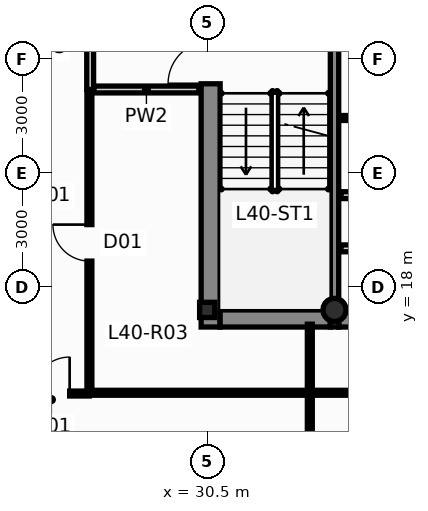
"""IFC4 building model, lengths in metres.
Left out: names, types, materials, properties, quantities, classifications, styles, units other than length and angle.
Written with IfcOpenShell. Run it as: python <this file> out.ifc"""

import sys

from ifc_helpers import new_model, si_unit, direction, frame, frame_2d, origin, origin_2d, place, context, subcontext, project, spatial, rectangle, hollow_circle, i_section, extrude, source, transform, mapped, element, fill, save


model = new_model("IFC4")
c1 = context("Model", 3, precision=1e-05, world=origin(), true_north=direction((0.0, 1.0)))
c2 = subcontext(c1, "Body", "Model", "MODEL_VIEW")
j1 = project(units=[si_unit("LENGTHUNIT", "METRE"), si_unit("PLANEANGLEUNIT", "RADIAN")], contexts=[c1])
p1 = place(None, origin())
s1 = spatial("IfcSite", under=j1, at=p1, CompositionType="ELEMENT")
p2 = place(p1, origin())
s2 = spatial("IfcBuilding", under=s1, at=p2, CompositionType="ELEMENT")
p3 = place(p2, frame((0.0, 0.0, 154.85)))
s3 = spatial("IfcBuildingStorey", under=s2, at=p3, CompositionType="ELEMENT", Elevation=154.85)
m1 = source(origin(), c2, "Body", "SweptSolid", [
    extrude(i_section(OverallWidth=0.4, OverallDepth=0.4, WebThickness=0.02, FlangeThickness=0.032, at=origin_2d()), origin(), (0.0, 0.0, 1.0), 3.65),
])
p4 = place(p3, frame((30.5, 17.4, 0.0), z_axis=(0.0, 0.0, 1.0), x_axis=(1.0, 0.0, 0.0)))
e1 = element("IfcColumn", 1, at=p4, inside=s3, PredefinedType="COLUMN", context=c2, shape_type="MappedRepresentation", body=[
    mapped(m1, transform((0.0, 0.0, 0.0), scale=1.0)),
])
m2 = source(origin(), c2, "Body", "SweptSolid", [
    extrude(hollow_circle(Radius=0.305, WallThickness=0.025, at=origin_2d()), origin(), (0.0, 0.0, 1.0), 3.65),
])
p5 = place(p3, frame((33.85, 17.4, 0.0), z_axis=(0.0, 0.0, 1.0), x_axis=(1.0, 0.0, 0.0)))
e2 = element("IfcColumn", 2, at=p5, inside=s3, PredefinedType="COLUMN", context=c2, shape_type="MappedRepresentation", body=[
    mapped(m2, transform((0.0, 0.0, 0.0), scale=1.0)),
])
p6 = place(p3, frame((30.59, 16.95, 0.0), z_axis=(0.0, 0.0, 1.0), x_axis=(0.0, 1.0, 0.0)))
e3 = element("IfcWall", 3, at=p6, inside=s3, PredefinedType="SHEAR", context=c2, shape_type="SweptSolid", body=[
    extrude(rectangle(XDim=13.275, YDim=0.5, at=frame_2d((6.638, 0.0))), origin(), (0.0, 0.0, 1.0), 3.65),
])
p7 = place(p6, frame((6.4, 0.0, 0.0)))
e4 = element("IfcOpeningElement", 4, at=p7, cuts=e3, PredefinedType="OPENING", context=c2, shape_type="SweptSolid", body=[
    extrude(rectangle(XDim=1.12, YDim=2.15, at=frame_2d((0.56, 1.075))), frame((0.0, 0.262, 0.0), z_axis=(0.0, -1.0, 0.0), x_axis=(1.0, 0.0, 0.0)), (0.0, 0.0, 1.0), 0.524),
])
p8 = place(p6, frame((10.85, 0.0, 0.0)))
e5 = element("IfcOpeningElement", 5, at=p8, cuts=e3, PredefinedType="OPENING", context=c2, shape_type="SweptSolid", body=[
    extrude(rectangle(XDim=1.2, YDim=2.2, at=frame_2d((0.6, 1.1))), frame((0.0, 0.262, 0.0), z_axis=(0.0, -1.0, 0.0), x_axis=(1.0, 0.0, 0.0)), (0.0, 0.0, 1.0), 0.524),
])
p9 = place(p3, frame((30.84, 17.175, 0.0), z_axis=(0.0, 0.0, 1.0), x_axis=(1.0, 0.0, 0.0)))
e6 = element("IfcWall", 6, at=p9, inside=s3, PredefinedType="SHEAR", context=c2, shape_type="SweptSolid", body=[
    extrude(rectangle(XDim=2.9, YDim=0.45, at=frame_2d((1.45, 0.0))), origin(), (0.0, 0.0, 1.0), 3.65),
])
p10 = place(p3, frame((33.96, 17.175, 0.0), z_axis=(0.0, 0.0, 1.0), x_axis=(1.0, 0.0, 0.0)))
e7 = element("IfcWall", 7, at=p10, inside=s3, PredefinedType="SHEAR", context=c2, shape_type="SweptSolid", body=[
    extrude(rectangle(XDim=8.08, YDim=0.45, at=frame_2d((4.04, 0.0))), origin(), (0.0, 0.0, 1.0), 3.65),
])
p11 = place(p3, frame((33.85, 16.95, 0.0), z_axis=(0.0, 0.0, 1.0), x_axis=(0.0, 1.0, 0.0)))
e8 = element("IfcWall", 8, at=p11, inside=s3, PredefinedType="SHEAR", context=c2, shape_type="SweptSolid", body=[
    extrude(rectangle(XDim=13.275, YDim=0.22, at=frame_2d((6.638, 0.0))), origin(), (0.0, 0.0, 1.0), 3.65),
])
p12 = place(p3, frame((27.42, 23.2, 0.0), z_axis=(0.0, 0.0, 1.0), x_axis=(0.0, 1.0, 0.0)))
e9 = element("IfcWall", 9, at=p12, inside=s3, PredefinedType="PARTITIONING", context=c2, shape_type="SweptSolid", body=[
    extrude(rectangle(XDim=6.4, YDim=0.18, at=frame_2d((3.2, 0.0))), origin(), (0.0, 0.0, 1.0), 3.078),
])
p13 = place(p12, frame((2.65, 0.0, 0.0)))
e10 = element("IfcOpeningElement", 10, at=p13, cuts=e9, PredefinedType="OPENING", context=c2, shape_type="SweptSolid", body=[
    extrude(rectangle(XDim=1.05, YDim=2.15, at=frame_2d((0.525, 1.075))), frame((0.0, 0.102, 0.0), z_axis=(0.0, -1.0, 0.0), x_axis=(1.0, 0.0, 0.0)), (0.0, 0.0, 1.0), 0.204),
])
p14 = place(p3, frame((27.52, 23.2, 0.0), z_axis=(0.0, 0.0, 1.0), x_axis=(1.0, 0.0, 0.0)))
e11 = element("IfcWall", 11, at=p14, inside=s3, PredefinedType="PARTITIONING", context=c2, shape_type="SweptSolid", body=[
    extrude(rectangle(XDim=2.76, YDim=0.18, at=frame_2d((1.38, 0.0))), origin(), (0.0, 0.0, 1.0), 3.4),
])
p15 = place(p3, frame((34.02, 20.42, 0.0), z_axis=(0.0, 0.0, 1.0), x_axis=(1.0, 0.0, 0.0)))
e12 = element("IfcWall", 12, at=p15, inside=s3, PredefinedType="PARTITIONING", context=c2, shape_type="SweptSolid", body=[
    extrude(rectangle(XDim=3.64, YDim=0.18, at=frame_2d((1.82, 0.0))), origin(), (0.0, 0.0, 1.0), 3.4),
])
p16 = place(p3, frame((34.02, 22.45, 0.0), z_axis=(0.0, 0.0, 1.0), x_axis=(1.0, 0.0, 0.0)))
e13 = element("IfcWall", 13, at=p16, inside=s3, PredefinedType="PARTITIONING", context=c2, shape_type="SweptSolid", body=[
    extrude(rectangle(XDim=3.58, YDim=0.13, at=frame_2d((1.79, 0.0))), origin(), (0.0, 0.0, 1.0), 3.4),
])
p17 = place(p3, frame((34.02, 19.02, 0.0), z_axis=(0.0, 0.0, 1.0), x_axis=(1.0, 0.0, 0.0)))
e14 = element("IfcWall", 14, at=p17, inside=s3, PredefinedType="PARTITIONING", context=c2, shape_type="SweptSolid", body=[
    extrude(rectangle(XDim=3.58, YDim=0.18, at=frame_2d((1.79, 0.0))), origin(), (0.0, 0.0, 1.0), 3.4),
])
p18 = place(p3, frame((33.205, 15.22, 0.0), z_axis=(0.0, 0.0, 1.0), x_axis=(1.0, 0.0, 0.0)))
e15 = element("IfcWall", 15, at=p18, inside=s3, PredefinedType="PARTITIONING", context=c2, shape_type="SweptSolid", body=[
    extrude(rectangle(XDim=9.59, YDim=0.13, at=frame_2d((4.795, 0.0))), origin(), (0.0, 0.0, 1.0), 3.078),
])
p19 = place(p18, frame((4.315, 0.0, 0.0)))
e16 = element("IfcOpeningElement", 16, at=p19, cuts=e15, PredefinedType="OPENING", context=c2, shape_type="SweptSolid", body=[
    extrude(rectangle(XDim=0.96, YDim=2.15, at=frame_2d((0.48, 1.075))), frame((0.0, 0.077, 0.0), z_axis=(0.0, -1.0, 0.0), x_axis=(1.0, 0.0, 0.0)), (0.0, 0.0, 1.0), 0.154),
])
p20 = place(p3, frame((33.2, 6.569, 0.0), z_axis=(0.0, 0.0, 1.0), x_axis=(0.0, 1.0, 0.0)))
e17 = element("IfcWall", 17, at=p20, inside=s3, PredefinedType="PARTITIONING", context=c2, shape_type="SweptSolid", body=[
    extrude(rectangle(XDim=8.646, YDim=0.13, at=frame_2d((4.323, 0.0))), origin(), (0.0, 0.0, 1.0), 3.4),
])
p21 = place(p20, frame((3.893, 0.0, 0.0)))
e18 = element("IfcOpeningElement", 18, at=p21, cuts=e17, PredefinedType="OPENING", context=c2, shape_type="SweptSolid", body=[
    extrude(rectangle(XDim=0.96, YDim=2.15, at=frame_2d((0.48, 1.075))), frame((0.0, 0.077, 0.0), z_axis=(0.0, -1.0, 0.0), x_axis=(1.0, 0.0, 0.0)), (0.0, 0.0, 1.0), 0.154),
])
p22 = place(p3, frame((27.4, 15.225, 0.0), z_axis=(0.0, 0.0, 1.0), x_axis=(0.0, 1.0, 0.0)))
e19 = element("IfcWall", 19, at=p22, inside=s3, PredefinedType="PARTITIONING", context=c2, shape_type="SweptSolid", body=[
    extrude(rectangle(XDim=7.88, YDim=0.13, at=frame_2d((3.94, 0.0))), origin(), (0.0, 0.0, 1.0), 3.4),
])
p23 = place(p22, frame((3.46, 0.0, 0.0)))
e20 = element("IfcOpeningElement", 20, at=p23, cuts=e19, PredefinedType="OPENING", context=c2, shape_type="SweptSolid", body=[
    extrude(rectangle(XDim=0.96, YDim=2.15, at=frame_2d((0.48, 1.075))), frame((0.0, 0.077, 0.0), z_axis=(0.0, -1.0, 0.0), x_axis=(1.0, 0.0, 0.0)), (0.0, 0.0, 1.0), 0.154),
])
p24 = place(p3, frame((27.405, 15.22, 0.0), z_axis=(0.0, 0.0, 1.0), x_axis=(1.0, 0.0, 0.0)))
e21 = element("IfcWall", 21, at=p24, inside=s3, PredefinedType="PARTITIONING", context=c2, shape_type="SweptSolid", body=[
    extrude(rectangle(XDim=5.79, YDim=0.13, at=frame_2d((2.895, 0.0))), origin(), (0.0, 0.0, 1.0), 3.078),
])
p25 = place(p3, frame((25.405, 15.2, 0.0), z_axis=(0.0, 0.0, 1.0), x_axis=(1.0, 0.0, 0.0)))
e22 = element("IfcWall", 22, at=p25, inside=s3, PredefinedType="PARTITIONING", context=c2, shape_type="SweptSolid", body=[
    extrude(rectangle(XDim=1.99, YDim=0.13, at=frame_2d((0.995, 0.0))), origin(), (0.0, 0.0, 1.0), 3.4),
])
p26 = place(p25, frame((0.515, 0.0, 0.0)))
e23 = element("IfcOpeningElement", 23, at=p26, cuts=e22, PredefinedType="OPENING", context=c2, shape_type="SweptSolid", body=[
    extrude(rectangle(XDim=0.96, YDim=2.15, at=frame_2d((0.48, 1.075))), frame((0.0, 0.077, 0.0), z_axis=(0.0, -1.0, 0.0), x_axis=(1.0, 0.0, 0.0)), (0.0, 0.0, 1.0), 0.154),
])
p27 = place(p3, frame((33.2, 15.225, 0.0), z_axis=(0.0, 0.0, 1.0), x_axis=(0.0, 1.0, 0.0)))
e24 = element("IfcWall", 24, at=p27, inside=s3, PredefinedType="PARTITIONING", context=c2, shape_type="SweptSolid", body=[
    extrude(rectangle(XDim=1.8, YDim=0.13, at=frame_2d((0.9, 0.0))), origin(), (0.0, 0.0, 1.0), 3.4),
])
p28 = place(p7, origin())
e25 = element("IfcDoor", 25, at=p28, inside=s3, OperationType="SINGLE_SWING_LEFT", PredefinedType="DOOR", context=c2, shape_type="SweptSolid", body=[
    extrude(rectangle(XDim=1.12, YDim=2.15, at=frame_2d((0.56, 1.075))), frame((0.0, 0.025, 0.0), z_axis=(0.0, -1.0, 0.0), x_axis=(1.0, 0.0, 0.0)), (0.0, 0.0, 1.0), 0.05),
])
fill(e4, e25)
p29 = place(p23, origin())
e26 = element("IfcDoor", 26, at=p29, inside=s3, OperationType="SINGLE_SWING_RIGHT", PredefinedType="DOOR", context=c2, shape_type="SweptSolid", body=[
    extrude(rectangle(XDim=0.96, YDim=2.15, at=frame_2d((0.48, 1.075))), frame((0.0, 0.025, 0.0), z_axis=(0.0, -1.0, 0.0), x_axis=(1.0, 0.0, 0.0)), (0.0, 0.0, 1.0), 0.05),
])
fill(e20, e26)
p30 = place(p26, origin())
e27 = element("IfcDoor", 27, at=p30, inside=s3, OperationType="SINGLE_SWING_RIGHT", PredefinedType="DOOR", context=c2, shape_type="SweptSolid", body=[
    extrude(rectangle(XDim=0.96, YDim=2.15, at=frame_2d((0.48, 1.075))), frame((0.0, 0.025, 0.0), z_axis=(0.0, -1.0, 0.0), x_axis=(1.0, 0.0, 0.0)), (0.0, 0.0, 1.0), 0.05),
])
fill(e23, e27)
save(model, sys.argv[1])
